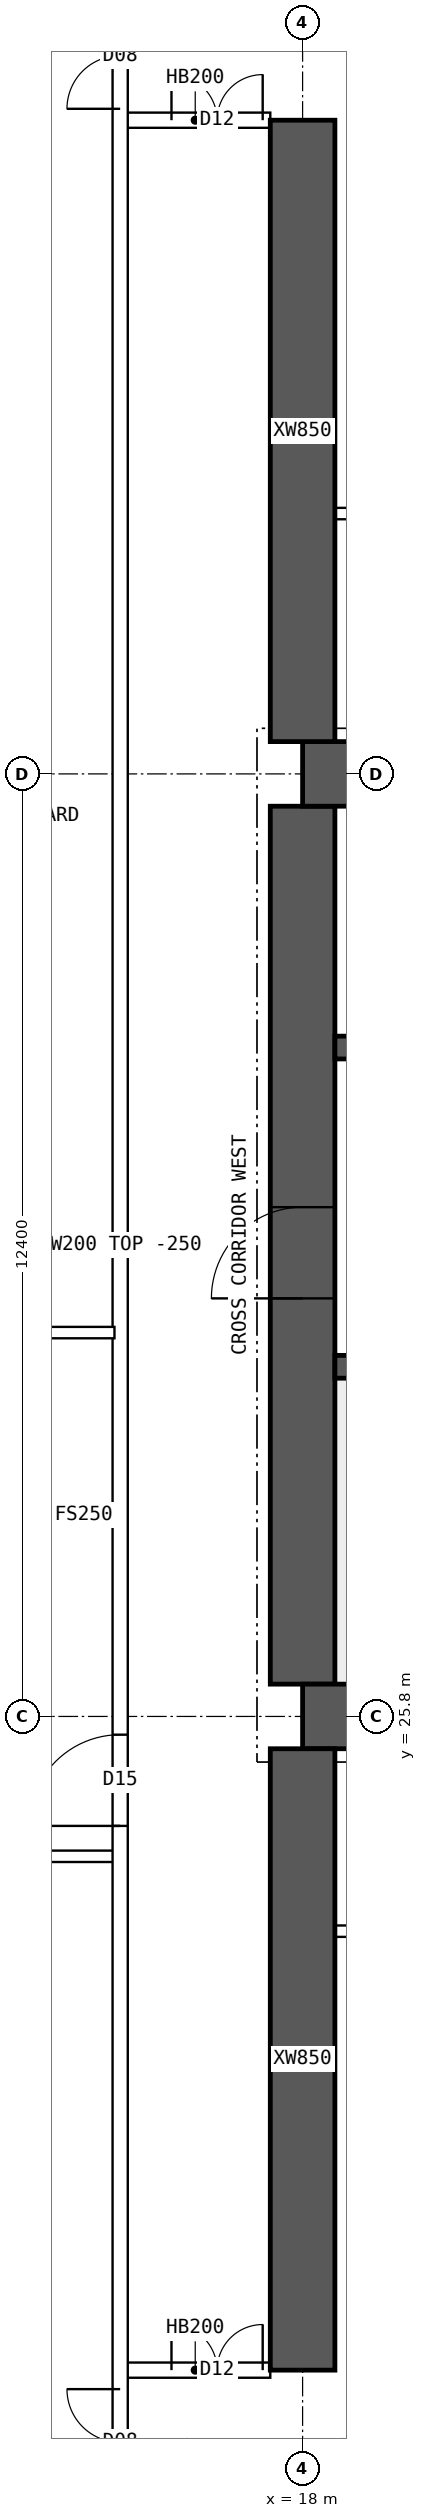
"""IFC4 building model, lengths in metres.
Left out: names, types, materials, properties, quantities, classifications, styles, units other than length and angle.
Written with IfcOpenShell. Run it as: python <this file> out.ifc"""

import sys

from ifc_helpers import new_model, si_unit, direction, frame, frame_2d, origin, place, context, subcontext, project, spatial, polyline, rectangle, outline, extrude, element, fill, save


model = new_model("IFC4")
c1 = context("Model", 3, precision=1e-05, world=origin(), true_north=direction((0.0, 1.0)))
c2 = subcontext(c1, "Body", "Model", "MODEL_VIEW")
j1 = project(units=[si_unit("LENGTHUNIT", "METRE"), si_unit("PLANEANGLEUNIT", "RADIAN")], contexts=[c1])
p1 = place(None, origin())
s1 = spatial("IfcSite", under=j1, at=p1, CompositionType="ELEMENT")
p2 = place(p1, origin())
s2 = spatial("IfcBuilding", under=s1, at=p2, CompositionType="ELEMENT")
p3 = place(p2, frame((0.0, 0.0, 167.35)))
s3 = spatial("IfcBuildingStorey", under=s2, at=p3, CompositionType="ELEMENT", Elevation=167.35)
for number, where, z_axis, x_axis in (
    (1, (18.0, 25.8, 0.0), (0.0, 0.0, 1.0), (1.0, 0.0, 0.0)),
    (2, (18.0, 38.2, 0.0), (0.0, 0.0, 1.0), (1.0, 0.0, 0.0)),
):
    element("IfcWall", number, at=place(p3, frame(where, z_axis=z_axis, x_axis=x_axis)), inside=s3, PredefinedType="SHEAR", context=c2, shape_type="SweptSolid", body=[
        extrude(rectangle(XDim=48.0, YDim=0.85, at=frame_2d((24.0, 0.0))), origin(), (0.0, 0.0, 1.0), 3.75),
    ])
p4 = place(p3, frame((18.0, 26.225, 0.0), z_axis=(0.0, 0.0, 1.0), x_axis=(0.0, 1.0, 0.0)))
e3 = element("IfcWall", 3, at=p4, inside=s3, PredefinedType="SHEAR", context=c2, shape_type="SweptSolid", body=[
    extrude(rectangle(XDim=11.55, YDim=0.85, at=frame_2d((5.775, 0.0))), origin(), (0.0, 0.0, 1.0), 3.75),
])
p5 = place(p4, frame((5.075, 0.0, 0.0)))
e4 = element("IfcOpeningElement", 4, at=p5, cuts=e3, PredefinedType="OPENING", context=c2, shape_type="SweptSolid", body=[
    extrude(rectangle(XDim=1.2, YDim=2.1, at=frame_2d((0.6, 1.05))), frame((0.0, 0.435, 0.0), z_axis=(0.0, -1.0, 0.0), x_axis=(1.0, 0.0, 0.0)), (0.0, 0.0, 1.0), 0.87),
])
p6 = place(p3, frame((18.425, 30.4, 0.0), z_axis=(0.0, 0.0, 1.0), x_axis=(1.0, 0.0, 0.0)))
e5 = element("IfcWall", 5, at=p6, inside=s3, PredefinedType="SHEAR", context=c2, shape_type="SweptSolid", body=[
    extrude(rectangle(XDim=47.15, YDim=0.3, at=frame_2d((23.575, 0.0))), origin(), (0.0, 0.0, 1.0), 3.75),
])
p7 = place(p6, frame((0.4, 0.0, 0.0)))
e6 = element("IfcOpeningElement", 6, at=p7, cuts=e5, PredefinedType="OPENING", context=c2, shape_type="SweptSolid", body=[
    extrude(rectangle(XDim=1.0, YDim=2.1, at=frame_2d((0.5, 1.05))), frame((0.0, 0.16, 0.0), z_axis=(0.0, -1.0, 0.0), x_axis=(1.0, 0.0, 0.0)), (0.0, 0.0, 1.0), 0.32),
])
p8 = place(p6, frame((45.75, 0.0, 0.0)))
e7 = element("IfcOpeningElement", 7, at=p8, cuts=e5, PredefinedType="OPENING", context=c2, shape_type="SweptSolid", body=[
    extrude(rectangle(XDim=1.0, YDim=2.1, at=frame_2d((0.5, 1.05))), frame((0.0, 0.16, 0.0), z_axis=(0.0, -1.0, 0.0), x_axis=(1.0, 0.0, 0.0)), (0.0, 0.0, 1.0), 0.32),
])
p9 = place(p6, frame((8.325, 0.0, 0.0)))
e8 = element("IfcOpeningElement", 8, at=p9, cuts=e5, PredefinedType="OPENING", context=c2, shape_type="SweptSolid", body=[
    extrude(rectangle(XDim=1.1, YDim=2.1, at=frame_2d((0.55, 1.05))), frame((0.0, 0.16, 0.0), z_axis=(0.0, -1.0, 0.0), x_axis=(1.0, 0.0, 0.0)), (0.0, 0.0, 1.0), 0.32),
])
p10 = place(p6, frame((10.925, 0.0, 0.0)))
e9 = element("IfcOpeningElement", 9, at=p10, cuts=e5, PredefinedType="OPENING", context=c2, shape_type="SweptSolid", body=[
    extrude(rectangle(XDim=1.1, YDim=2.1, at=frame_2d((0.55, 1.05))), frame((0.0, 0.16, 0.0), z_axis=(0.0, -1.0, 0.0), x_axis=(1.0, 0.0, 0.0)), (0.0, 0.0, 1.0), 0.32),
])
p11 = place(p6, frame((13.525, 0.0, 0.0)))
e10 = element("IfcOpeningElement", 10, at=p11, cuts=e5, PredefinedType="OPENING", context=c2, shape_type="SweptSolid", body=[
    extrude(rectangle(XDim=1.1, YDim=2.1, at=frame_2d((0.55, 1.05))), frame((0.0, 0.16, 0.0), z_axis=(0.0, -1.0, 0.0), x_axis=(1.0, 0.0, 0.0)), (0.0, 0.0, 1.0), 0.32),
])
p12 = place(p6, frame((16.125, 0.0, 0.0)))
e11 = element("IfcOpeningElement", 11, at=p12, cuts=e5, PredefinedType="OPENING", context=c2, shape_type="SweptSolid", body=[
    extrude(rectangle(XDim=1.1, YDim=2.1, at=frame_2d((0.55, 1.05))), frame((0.0, 0.16, 0.0), z_axis=(0.0, -1.0, 0.0), x_axis=(1.0, 0.0, 0.0)), (0.0, 0.0, 1.0), 0.32),
])
p13 = place(p6, frame((18.9, 0.0, 0.0)))
e12 = element("IfcOpeningElement", 12, at=p13, cuts=e5, PredefinedType="OPENING", context=c2, shape_type="SweptSolid", body=[
    extrude(rectangle(XDim=0.9, YDim=2.1, at=frame_2d((0.45, 1.05))), frame((0.0, 0.16, 0.0), z_axis=(0.0, -1.0, 0.0), x_axis=(1.0, 0.0, 0.0)), (0.0, 0.0, 1.0), 0.32),
])
p14 = place(p6, frame((30.192, 0.0, 0.0)))
e13 = element("IfcOpeningElement", 13, at=p14, cuts=e5, PredefinedType="OPENING", context=c2, shape_type="SweptSolid", body=[
    extrude(rectangle(XDim=1.1, YDim=2.1, at=frame_2d((0.55, 1.05))), frame((0.0, 0.16, 0.0), z_axis=(0.0, -1.0, 0.0), x_axis=(1.0, 0.0, 0.0)), (0.0, 0.0, 1.0), 0.32),
])
p15 = place(p6, frame((33.725, 0.0, 0.0)))
e14 = element("IfcOpeningElement", 14, at=p15, cuts=e5, PredefinedType="OPENING", context=c2, shape_type="SweptSolid", body=[
    extrude(rectangle(XDim=1.1, YDim=2.1, at=frame_2d((0.55, 1.05))), frame((0.0, 0.16, 0.0), z_axis=(0.0, -1.0, 0.0), x_axis=(1.0, 0.0, 0.0)), (0.0, 0.0, 1.0), 0.32),
])
p16 = place(p6, frame((37.258, 0.0, 0.0)))
e15 = element("IfcOpeningElement", 15, at=p16, cuts=e5, PredefinedType="OPENING", context=c2, shape_type="SweptSolid", body=[
    extrude(rectangle(XDim=1.1, YDim=2.1, at=frame_2d((0.55, 1.05))), frame((0.0, 0.16, 0.0), z_axis=(0.0, -1.0, 0.0), x_axis=(1.0, 0.0, 0.0)), (0.0, 0.0, 1.0), 0.32),
])
p17 = place(p3, frame((18.425, 34.6, 0.0), z_axis=(0.0, 0.0, 1.0), x_axis=(1.0, 0.0, 0.0)))
e16 = element("IfcWall", 16, at=p17, inside=s3, PredefinedType="SHEAR", context=c2, shape_type="SweptSolid", body=[
    extrude(rectangle(XDim=47.15, YDim=0.3, at=frame_2d((23.575, 0.0))), origin(), (0.0, 0.0, 1.0), 3.75),
])
p18 = place(p17, frame((0.9, 0.0, 0.0)))
e17 = element("IfcOpeningElement", 17, at=p18, cuts=e16, PredefinedType="OPENING", context=c2, shape_type="SweptSolid", body=[
    extrude(rectangle(XDim=1.1, YDim=2.1, at=frame_2d((0.55, 1.05))), frame((0.0, 0.16, 0.0), z_axis=(0.0, -1.0, 0.0), x_axis=(1.0, 0.0, 0.0)), (0.0, 0.0, 1.0), 0.32),
])
p19 = place(p17, frame((45.15, 0.0, 0.0)))
e18 = element("IfcOpeningElement", 18, at=p19, cuts=e16, PredefinedType="OPENING", context=c2, shape_type="SweptSolid", body=[
    extrude(rectangle(XDim=1.1, YDim=2.1, at=frame_2d((0.55, 1.05))), frame((0.0, 0.16, 0.0), z_axis=(0.0, -1.0, 0.0), x_axis=(1.0, 0.0, 0.0)), (0.0, 0.0, 1.0), 0.32),
])
p20 = place(p17, frame((4.175, 0.0, 0.0)))
e19 = element("IfcOpeningElement", 19, at=p20, cuts=e16, PredefinedType="OPENING", context=c2, shape_type="SweptSolid", body=[
    extrude(rectangle(XDim=0.9, YDim=2.1, at=frame_2d((0.45, 1.05))), frame((0.0, 0.16, 0.0), z_axis=(0.0, -1.0, 0.0), x_axis=(1.0, 0.0, 0.0)), (0.0, 0.0, 1.0), 0.32),
])
p21 = place(p17, frame((42.075, 0.0, 0.0)))
e20 = element("IfcOpeningElement", 20, at=p21, cuts=e16, PredefinedType="OPENING", context=c2, shape_type="SweptSolid", body=[
    extrude(rectangle(XDim=0.9, YDim=2.1, at=frame_2d((0.45, 1.05))), frame((0.0, 0.16, 0.0), z_axis=(0.0, -1.0, 0.0), x_axis=(1.0, 0.0, 0.0)), (0.0, 0.0, 1.0), 0.32),
])
p22 = place(p17, frame((8.95, 0.0, 0.0)))
e21 = element("IfcOpeningElement", 21, at=p22, cuts=e16, PredefinedType="OPENING", context=c2, shape_type="SweptSolid", body=[
    extrude(rectangle(XDim=0.9, YDim=2.1, at=frame_2d((0.45, 1.05))), frame((0.0, 0.16, 0.0), z_axis=(0.0, -1.0, 0.0), x_axis=(1.0, 0.0, 0.0)), (0.0, 0.0, 1.0), 0.32),
])
p23 = place(p17, frame((12.924, 0.0, 0.0)))
e22 = element("IfcOpeningElement", 22, at=p23, cuts=e16, PredefinedType="OPENING", context=c2, shape_type="SweptSolid", body=[
    extrude(rectangle(XDim=0.9, YDim=2.1, at=frame_2d((0.45, 1.05))), frame((0.0, 0.16, 0.0), z_axis=(0.0, -1.0, 0.0), x_axis=(1.0, 0.0, 0.0)), (0.0, 0.0, 1.0), 0.32),
])
p24 = place(p17, frame((16.571, 0.0, 0.0)))
e23 = element("IfcOpeningElement", 23, at=p24, cuts=e16, PredefinedType="OPENING", context=c2, shape_type="SweptSolid", body=[
    extrude(rectangle(XDim=0.9, YDim=2.1, at=frame_2d((0.45, 1.05))), frame((0.0, 0.16, 0.0), z_axis=(0.0, -1.0, 0.0), x_axis=(1.0, 0.0, 0.0)), (0.0, 0.0, 1.0), 0.32),
])
p25 = place(p17, frame((20.33, 0.0, 0.0)))
e24 = element("IfcOpeningElement", 24, at=p25, cuts=e16, PredefinedType="OPENING", context=c2, shape_type="SweptSolid", body=[
    extrude(rectangle(XDim=0.9, YDim=2.1, at=frame_2d((0.45, 1.05))), frame((0.0, 0.16, 0.0), z_axis=(0.0, -1.0, 0.0), x_axis=(1.0, 0.0, 0.0)), (0.0, 0.0, 1.0), 0.32),
])
p26 = place(p17, frame((24.736, 0.0, 0.0)))
e25 = element("IfcOpeningElement", 25, at=p26, cuts=e16, PredefinedType="OPENING", context=c2, shape_type="SweptSolid", body=[
    extrude(rectangle(XDim=0.9, YDim=2.1, at=frame_2d((0.45, 1.05))), frame((0.0, 0.16, 0.0), z_axis=(0.0, -1.0, 0.0), x_axis=(1.0, 0.0, 0.0)), (0.0, 0.0, 1.0), 0.32),
])
p27 = place(p17, frame((27.533, 0.0, 0.0)))
e26 = element("IfcOpeningElement", 26, at=p27, cuts=e16, PredefinedType="OPENING", context=c2, shape_type="SweptSolid", body=[
    extrude(rectangle(XDim=0.9, YDim=2.1, at=frame_2d((0.45, 1.05))), frame((0.0, 0.16, 0.0), z_axis=(0.0, -1.0, 0.0), x_axis=(1.0, 0.0, 0.0)), (0.0, 0.0, 1.0), 0.32),
])
p28 = place(p17, frame((29.906, 0.0, 0.0)))
e27 = element("IfcOpeningElement", 27, at=p28, cuts=e16, PredefinedType="OPENING", context=c2, shape_type="SweptSolid", body=[
    extrude(rectangle(XDim=0.9, YDim=2.1, at=frame_2d((0.45, 1.05))), frame((0.0, 0.16, 0.0), z_axis=(0.0, -1.0, 0.0), x_axis=(1.0, 0.0, 0.0)), (0.0, 0.0, 1.0), 0.32),
])
p29 = place(p17, frame((33.756, 0.0, 0.0)))
e28 = element("IfcOpeningElement", 28, at=p29, cuts=e16, PredefinedType="OPENING", context=c2, shape_type="SweptSolid", body=[
    extrude(rectangle(XDim=0.9, YDim=2.1, at=frame_2d((0.45, 1.05))), frame((0.0, 0.16, 0.0), z_axis=(0.0, -1.0, 0.0), x_axis=(1.0, 0.0, 0.0)), (0.0, 0.0, 1.0), 0.32),
])
p30 = place(p17, frame((37.504, 0.0, 0.0)))
e29 = element("IfcOpeningElement", 29, at=p30, cuts=e16, PredefinedType="OPENING", context=c2, shape_type="SweptSolid", body=[
    extrude(rectangle(XDim=0.9, YDim=2.1, at=frame_2d((0.45, 1.05))), frame((0.0, 0.16, 0.0), z_axis=(0.0, -1.0, 0.0), x_axis=(1.0, 0.0, 0.0)), (0.0, 0.0, 1.0), 0.32),
])
for number, where, z_axis, x_axis in (
    (30, (18.0, 17.2, 0.0), (0.0, 0.0, 1.0), (0.0, 1.0, 0.0)),
    (31, (18.0, 38.625, 0.0), (0.0, 0.0, 1.0), (0.0, 1.0, 0.0)),
):
    element("IfcWall", number, at=place(p3, frame(where, z_axis=z_axis, x_axis=x_axis)), inside=s3, PredefinedType="SHEAR", context=c2, shape_type="SweptSolid", body=[
        extrude(rectangle(XDim=8.175, YDim=0.85, at=frame_2d((4.087, 0.0))), origin(), (0.0, 0.0, 1.0), 3.75),
    ])
p31 = place(p3, frame((15.6, 17.2, 0.0), z_axis=(0.0, 0.0, 1.0), x_axis=(1.0, 0.0, 0.0)))
e32 = element("IfcWall", 32, at=p31, inside=s3, PredefinedType="SOLIDWALL", context=c2, shape_type="SweptSolid", body=[
    extrude(rectangle(XDim=1.975, YDim=0.2, at=frame_2d((0.987, 0.0))), origin(), (0.0, 0.0, 1.0), 3.5),
])
p32 = place(p31, frame((0.675, 0.0, 0.0)))
e33 = element("IfcOpeningElement", 33, at=p32, cuts=e32, PredefinedType="OPENING", context=c2, shape_type="SweptSolid", body=[
    extrude(rectangle(XDim=1.2, YDim=2.1, at=frame_2d((0.6, 1.05))), frame((0.0, 0.11, 0.0), z_axis=(0.0, -1.0, 0.0), x_axis=(1.0, 0.0, 0.0)), (0.0, 0.0, 1.0), 0.22),
])
p33 = place(p3, frame((15.6, 46.8, 0.0), z_axis=(0.0, 0.0, 1.0), x_axis=(1.0, 0.0, 0.0)))
e34 = element("IfcWall", 34, at=p33, inside=s3, PredefinedType="SOLIDWALL", context=c2, shape_type="SweptSolid", body=[
    extrude(rectangle(XDim=1.975, YDim=0.2, at=frame_2d((0.987, 0.0))), origin(), (0.0, 0.0, 1.0), 3.5),
])
p34 = place(p33, frame((0.675, 0.0, 0.0)))
e35 = element("IfcOpeningElement", 35, at=p34, cuts=e34, PredefinedType="OPENING", context=c2, shape_type="SweptSolid", body=[
    extrude(rectangle(XDim=1.2, YDim=2.1, at=frame_2d((0.6, 1.05))), frame((0.0, 0.11, 0.0), z_axis=(0.0, -1.0, 0.0), x_axis=(1.0, 0.0, 0.0)), (0.0, 0.0, 1.0), 0.22),
])
p35 = place(p3, frame((18.425, 22.975, 0.0), z_axis=(0.0, 0.0, 1.0), x_axis=(1.0, 0.0, 0.0)))
e36 = element("IfcWall", 36, at=p35, inside=s3, PredefinedType="PARTITIONING", context=c2, shape_type="SweptSolid", body=[
    extrude(rectangle(XDim=5.5, YDim=0.15, at=frame_2d((2.75, 0.0))), origin(), (0.0, 0.0, 1.0), 3.5),
])
p36 = place(p35, frame((0.4, 0.0, 0.0)))
e37 = element("IfcOpeningElement", 37, at=p36, cuts=e36, PredefinedType="OPENING", context=c2, shape_type="SweptSolid", body=[
    extrude(rectangle(XDim=1.0, YDim=2.1, at=frame_2d((0.5, 1.05))), frame((0.0, 0.085, 0.0), z_axis=(0.0, -1.0, 0.0), x_axis=(1.0, 0.0, 0.0)), (0.0, 0.0, 1.0), 0.17),
])
p37 = place(p3, frame((23.925, 41.625, 0.0), z_axis=(0.0, 0.0, 1.0), x_axis=(-1.0, 0.0, 0.0)))
e38 = element("IfcWall", 38, at=p37, inside=s3, PredefinedType="PARTITIONING", context=c2, shape_type="SweptSolid", body=[
    extrude(rectangle(XDim=5.5, YDim=0.15, at=frame_2d((2.75, 0.0))), origin(), (0.0, 0.0, 1.0), 3.5),
])
p38 = place(p37, frame((0.4, 0.0, 0.0)))
e39 = element("IfcOpeningElement", 39, at=p38, cuts=e38, PredefinedType="OPENING", context=c2, shape_type="SweptSolid", body=[
    extrude(rectangle(XDim=1.0, YDim=2.1, at=frame_2d((0.5, 1.05))), frame((0.0, 0.085, 0.0), z_axis=(0.0, -1.0, 0.0), x_axis=(1.0, 0.0, 0.0)), (0.0, 0.0, 1.0), 0.17),
])
p39 = place(p3, frame((8.705, 30.85, 0.0), z_axis=(0.0, 0.0, 1.0), x_axis=(1.0, 0.0, 0.0)))
e40 = element("IfcWall", 40, at=p39, inside=s3, PredefinedType="PARTITIONING", context=c2, shape_type="SweptSolid", body=[
    extrude(outline(polyline([(0.0, 0.0), (6.82, 0.0), (6.82, 3.5), (3.597, 3.5), (3.595, 3.05), (2.997, 3.05), (2.995, 3.5), (0.0, 3.5), (0.0, 0.0)])), frame((0.0, 0.075, 0.0), z_axis=(0.0, -1.0, 0.0), x_axis=(1.0, 0.0, 0.0)), (0.0, 0.0, 1.0), 0.15),
])
p40 = place(p3, frame((15.6, 10.446, 0.0), z_axis=(0.0, 0.0, 1.0), x_axis=(0.0, 1.0, 0.0)))
e41 = element("IfcWall", 41, at=p40, inside=s3, PredefinedType="SOLIDWALL", context=c2, shape_type="SweptSolid", body=[
    extrude(rectangle(XDim=43.107, YDim=0.2, at=frame_2d((21.554, 0.0))), origin(), (0.0, 0.0, 1.0), 3.5),
])
p41 = place(p40, frame((13.914, 0.0, 0.0)))
e42 = element("IfcOpeningElement", 42, at=p41, cuts=e41, PredefinedType="OPENING", context=c2, shape_type="SweptSolid", body=[
    extrude(rectangle(XDim=1.2, YDim=2.1, at=frame_2d((0.6, 1.05))), frame((0.0, 0.11, 0.0), z_axis=(0.0, -1.0, 0.0), x_axis=(1.0, 0.0, 0.0)), (0.0, 0.0, 1.0), 0.22),
])
p42 = place(p40, frame((5.104, 0.0, 0.0)))
e43 = element("IfcOpeningElement", 43, at=p42, cuts=e41, PredefinedType="OPENING", context=c2, shape_type="SweptSolid", body=[
    extrude(rectangle(XDim=1.4, YDim=2.1, at=frame_2d((0.7, 1.05))), frame((0.0, 0.11, 0.0), z_axis=(0.0, -1.0, 0.0), x_axis=(1.0, 0.0, 0.0)), (0.0, 0.0, 1.0), 0.22),
])
p43 = place(p40, frame((36.504, 0.0, 0.0)))
e44 = element("IfcOpeningElement", 44, at=p43, cuts=e41, PredefinedType="OPENING", context=c2, shape_type="SweptSolid", body=[
    extrude(rectangle(XDim=1.4, YDim=2.1, at=frame_2d((0.7, 1.05))), frame((0.0, 0.11, 0.0), z_axis=(0.0, -1.0, 0.0), x_axis=(1.0, 0.0, 0.0)), (0.0, 0.0, 1.0), 0.22),
])
p44 = place(p3, frame((8.705, 23.96, 0.0), z_axis=(0.0, 0.0, 1.0), x_axis=(1.0, 0.0, 0.0)))
e45 = element("IfcWall", 45, at=p44, inside=s3, PredefinedType="PARTITIONING", context=c2, shape_type="SweptSolid", body=[
    extrude(rectangle(XDim=6.82, YDim=0.15, at=frame_2d((3.41, 0.0))), origin(), (0.0, 0.0, 1.0), 3.5),
])
p45 = place(p5, origin())
e46 = element("IfcDoor", 46, at=p45, inside=s3, OperationType="SINGLE_SWING_LEFT", PredefinedType="DOOR", context=c2, shape_type="SweptSolid", body=[
    extrude(rectangle(XDim=1.2, YDim=2.1, at=frame_2d((0.6, 1.05))), frame((0.0, 0.025, 0.0), z_axis=(0.0, -1.0, 0.0), x_axis=(1.0, 0.0, 0.0)), (0.0, 0.0, 1.0), 0.05),
])
fill(e4, e46)
p46 = place(p32, origin())
e47 = element("IfcDoor", 47, at=p46, inside=s3, OperationType="DOUBLE_DOOR_SINGLE_SWING", PredefinedType="DOOR", context=c2, shape_type="SweptSolid", body=[
    extrude(rectangle(XDim=1.2, YDim=2.1, at=frame_2d((0.6, 1.05))), frame((0.0, 0.025, 0.0), z_axis=(0.0, -1.0, 0.0), x_axis=(1.0, 0.0, 0.0)), (0.0, 0.0, 1.0), 0.05),
])
fill(e33, e47)
p47 = place(p34, origin())
e48 = element("IfcDoor", 48, at=p47, inside=s3, OperationType="DOUBLE_DOOR_SINGLE_SWING", PredefinedType="DOOR", context=c2, shape_type="SweptSolid", body=[
    extrude(rectangle(XDim=1.2, YDim=2.1, at=frame_2d((0.6, 1.05))), frame((0.0, 0.025, 0.0), z_axis=(0.0, -1.0, 0.0), x_axis=(1.0, 0.0, 0.0)), (0.0, 0.0, 1.0), 0.05),
])
fill(e35, e48)
p48 = place(p41, origin())
e49 = element("IfcDoor", 49, at=p48, inside=s3, OperationType="SINGLE_SWING_LEFT", PredefinedType="DOOR", context=c2, shape_type="SweptSolid", body=[
    extrude(rectangle(XDim=1.2, YDim=2.1, at=frame_2d((0.6, 1.05))), frame((0.0, 0.025, 0.0), z_axis=(0.0, -1.0, 0.0), x_axis=(1.0, 0.0, 0.0)), (0.0, 0.0, 1.0), 0.05),
])
fill(e42, e49)
p49 = place(p42, origin())
e50 = element("IfcDoor", 50, at=p49, inside=s3, OperationType="DOUBLE_DOOR_SINGLE_SWING", PredefinedType="DOOR", context=c2, shape_type="SweptSolid", body=[
    extrude(rectangle(XDim=1.4, YDim=2.1, at=frame_2d((0.7, 1.05))), frame((0.0, 0.025, 0.0), z_axis=(0.0, -1.0, 0.0), x_axis=(1.0, 0.0, 0.0)), (0.0, 0.0, 1.0), 0.05),
])
fill(e43, e50)
p50 = place(p43, origin())
e51 = element("IfcDoor", 51, at=p50, inside=s3, OperationType="DOUBLE_DOOR_SINGLE_SWING", PredefinedType="DOOR", context=c2, shape_type="SweptSolid", body=[
    extrude(rectangle(XDim=1.4, YDim=2.1, at=frame_2d((0.7, 1.05))), frame((0.0, 0.025, 0.0), z_axis=(0.0, -1.0, 0.0), x_axis=(1.0, 0.0, 0.0)), (0.0, 0.0, 1.0), 0.05),
])
fill(e44, e51)
save(model, sys.argv[1])
